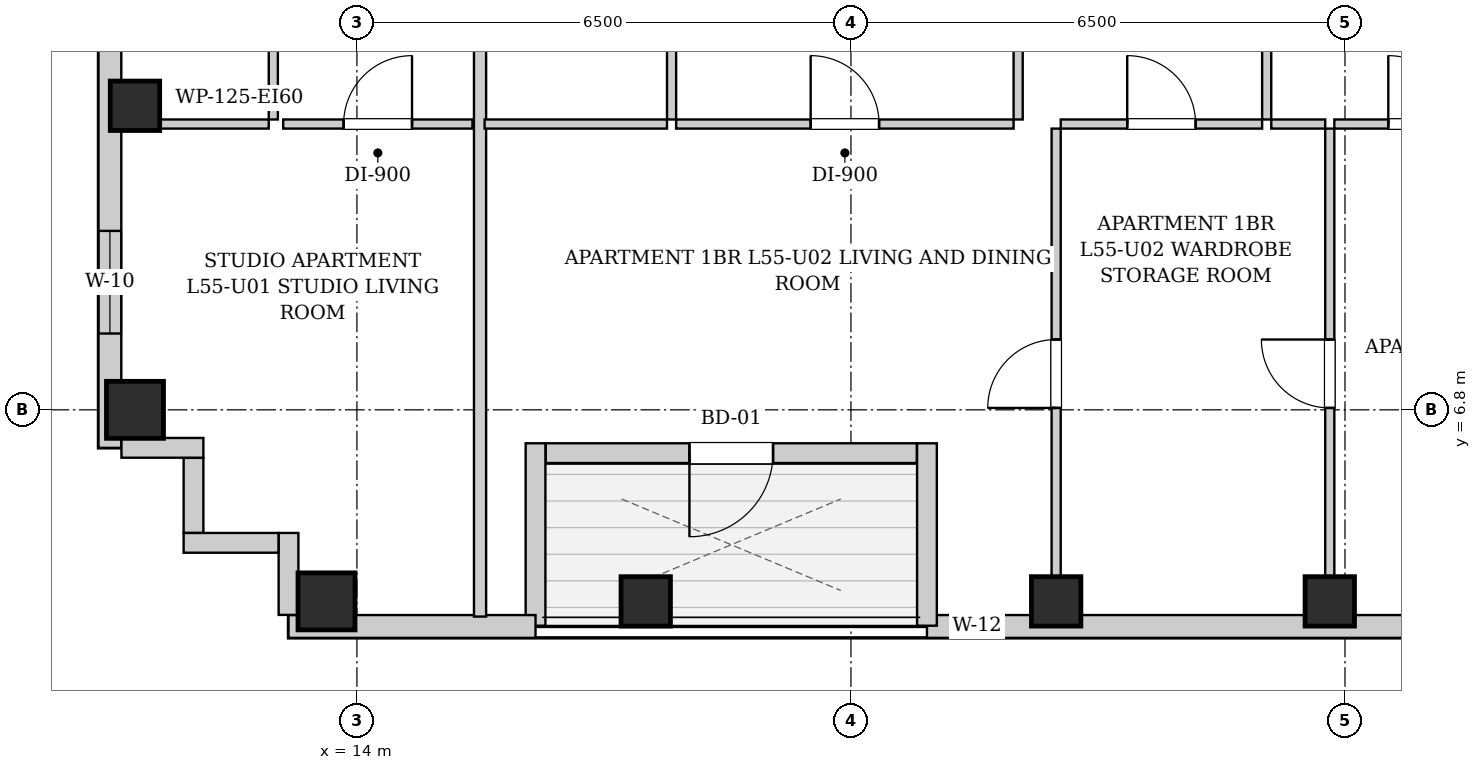
"""IFC4 building model, lengths in metres.
Left out: names, types, materials, properties, quantities, classifications, styles, units other than length and angle.
Written with IfcOpenShell. Run it as: python <this file> out.ifc"""

import sys

from ifc_helpers import new_model, si_unit, direction, frame, frame_2d, origin, origin_2d, place, context, subcontext, project, spatial, rectangle, extrude, element, fill, save


model = new_model("IFC4")
c1 = context("Model", 3, precision=1e-05, world=origin(), true_north=direction((0.0, 1.0)))
c2 = subcontext(c1, "Body", "Model", "MODEL_VIEW")
j1 = project(units=[si_unit("LENGTHUNIT", "METRE"), si_unit("PLANEANGLEUNIT", "RADIAN")], contexts=[c1])
p1 = place(None, origin())
s1 = spatial("IfcSite", under=j1, at=p1, CompositionType="ELEMENT")
p2 = place(p1, origin())
s2 = spatial("IfcBuilding", under=s1, at=p2, CompositionType="ELEMENT")
p3 = place(p2, frame((0.0, 0.0, 190.9)))
s3 = spatial("IfcBuildingStorey", under=s2, at=p3, CompositionType="ELEMENT", Elevation=190.9)
p4 = place(p3, frame((13.6, 4.28, 0.0), z_axis=(0.0, 0.0, 1.0), x_axis=(1.0, 0.0, 0.0)))
e1 = element("IfcColumn", 1, at=p4, inside=s3, PredefinedType="COLUMN", context=c2, shape_type="SweptSolid", body=[
    extrude(rectangle(XDim=0.75, YDim=0.75, at=origin_2d()), origin(), (0.0, 0.0, 1.0), 3.3),
])
for number, where, z_axis, x_axis in (
    (2, (17.8, 4.28, 0.0), (0.0, 0.0, 1.0), (1.0, 0.0, 0.0)),
    (3, (23.2, 4.28, 0.0), (0.0, 0.0, 1.0), (1.0, 0.0, 0.0)),
    (4, (26.8, 4.28, 0.0), (0.0, 0.0, 1.0), (1.0, 0.0, 0.0)),
):
    element("IfcColumn", number, at=place(p3, frame(where, z_axis=z_axis, x_axis=x_axis)), inside=s3, PredefinedType="COLUMN", context=c2, shape_type="SweptSolid", body=[
        extrude(rectangle(XDim=0.65, YDim=0.65, at=origin_2d()), origin(), (0.0, 0.0, 1.0), 3.3),
    ])
p5 = place(p3, frame((11.08, 6.8, 0.0), z_axis=(0.0, 0.0, 1.0), x_axis=(1.0, 0.0, 0.0)))
e5 = element("IfcColumn", 5, at=p5, inside=s3, PredefinedType="COLUMN", context=c2, shape_type="SweptSolid", body=[
    extrude(rectangle(XDim=0.75, YDim=0.75, at=origin_2d()), origin(), (0.0, 0.0, 1.0), 3.3),
])
p6 = place(p3, frame((11.08, 10.8, 0.0), z_axis=(0.0, 0.0, 1.0), x_axis=(1.0, 0.0, 0.0)))
e6 = element("IfcColumn", 6, at=p6, inside=s3, PredefinedType="COLUMN", context=c2, shape_type="SweptSolid", body=[
    extrude(rectangle(XDim=0.65, YDim=0.65, at=origin_2d()), origin(), (0.0, 0.0, 1.0), 3.3),
])
p7 = place(p3, frame((37.8, 3.95, 0.0), z_axis=(0.0, 0.0, 1.0), x_axis=(-1.0, 0.0, 0.0)))
e7 = element("IfcWall", 7, at=p7, inside=s3, PredefinedType="SOLIDWALL", context=c2, shape_type="SweptSolid", body=[
    extrude(rectangle(XDim=16.3, YDim=0.3, at=frame_2d((8.15, 0.0))), origin(), (0.0, 0.0, 1.0), 3.04),
])
p8 = place(p7, frame((15.3, 0.0, 0.55)))
e8 = element("IfcOpeningElement", 8, at=p8, cuts=e7, PredefinedType="OPENING", context=c2, shape_type="SweptSolid", body=[
    extrude(rectangle(XDim=0.68, YDim=1.2, at=frame_2d((0.34, 0.6))), frame((0.0, 0.16, 0.0), z_axis=(0.0, -1.0, 0.0), x_axis=(1.0, 0.0, 0.0)), (0.0, 0.0, 1.0), 0.32),
])
p9 = place(p7, frame((8.154, 0.0, 0.55)))
e9 = element("IfcOpeningElement", 9, at=p9, cuts=e7, PredefinedType="OPENING", context=c2, shape_type="SweptSolid", body=[
    extrude(rectangle(XDim=1.35, YDim=1.2, at=frame_2d((0.675, 0.6))), frame((0.0, 0.16, 0.0), z_axis=(0.0, -1.0, 0.0), x_axis=(1.0, 0.0, 0.0)), (0.0, 0.0, 1.0), 0.32),
])
p10 = place(p7, frame((2.721, 0.0, 0.55)))
e10 = element("IfcOpeningElement", 10, at=p10, cuts=e7, PredefinedType="OPENING", context=c2, shape_type="SweptSolid", body=[
    extrude(rectangle(XDim=1.35, YDim=1.2, at=frame_2d((0.675, 0.6))), frame((0.0, 0.16, 0.0), z_axis=(0.0, -1.0, 0.0), x_axis=(1.0, 0.0, 0.0)), (0.0, 0.0, 1.0), 0.32),
])
p11 = place(p7, frame((1.035, 0.0, 0.55)))
e11 = element("IfcOpeningElement", 11, at=p11, cuts=e7, PredefinedType="OPENING", context=c2, shape_type="SweptSolid", body=[
    extrude(rectangle(XDim=1.35, YDim=1.2, at=frame_2d((0.675, 0.6))), frame((0.0, 0.16, 0.0), z_axis=(0.0, -1.0, 0.0), x_axis=(1.0, 0.0, 0.0)), (0.0, 0.0, 1.0), 0.32),
])
p12 = place(p3, frame((21.5, 3.96, 0.0), z_axis=(0.0, 0.0, 1.0), x_axis=(0.0, 1.0, 0.0)))
e12 = element("IfcWall", 12, at=p12, inside=s3, PredefinedType="SOLIDWALL", context=c2, shape_type="SweptSolid", body=[
    extrude(rectangle(XDim=2.4, YDim=0.26, at=frame_2d((1.2, 0.0))), origin(), (0.0, 0.0, 1.0), 3.04),
])
p13 = place(p3, frame((21.366, 6.23, 0.0), z_axis=(0.0, 0.0, 1.0), x_axis=(-1.0, 0.0, 0.0)))
e13 = element("IfcWall", 13, at=p13, inside=s3, PredefinedType="SOLIDWALL", context=c2, shape_type="SweptSolid", body=[
    extrude(rectangle(XDim=4.882, YDim=0.26, at=frame_2d((2.441, 0.0))), origin(), (0.0, 0.0, 1.0), 3.04),
])
p14 = place(p13, frame((1.891, 0.0, 0.0)))
e14 = element("IfcOpeningElement", 14, at=p14, cuts=e13, PredefinedType="OPENING", context=c2, shape_type="SweptSolid", body=[
    extrude(rectangle(XDim=1.1, YDim=2.0, at=frame_2d((0.55, 1.0))), frame((0.0, 0.14, 0.0), z_axis=(0.0, -1.0, 0.0), x_axis=(1.0, 0.0, 0.0)), (0.0, 0.0, 1.0), 0.28),
])
p15 = place(p3, frame((16.35, 6.36, 0.0), z_axis=(0.0, 0.0, 1.0), x_axis=(0.0, -1.0, 0.0)))
e15 = element("IfcWall", 15, at=p15, inside=s3, PredefinedType="SOLIDWALL", context=c2, shape_type="SweptSolid", body=[
    extrude(rectangle(XDim=2.4, YDim=0.26, at=frame_2d((1.2, 0.0))), origin(), (0.0, 0.0, 1.0), 3.04),
])
p16 = place(p3, frame((16.35, 3.95, 0.0), z_axis=(0.0, 0.0, 1.0), x_axis=(-1.0, 0.0, 0.0)))
e16 = element("IfcWall", 16, at=p16, inside=s3, PredefinedType="SOLIDWALL", context=c2, shape_type="SweptSolid", body=[
    extrude(rectangle(XDim=3.25, YDim=0.3, at=frame_2d((1.625, 0.0))), origin(), (0.0, 0.0, 1.0), 3.04),
])
p17 = place(p3, frame((10.75, 6.3, 0.0), z_axis=(0.0, 0.0, 1.0), x_axis=(0.0, 1.0, 0.0)))
e17 = element("IfcWall", 17, at=p17, inside=s3, PredefinedType="SOLIDWALL", context=c2, shape_type="SweptSolid", body=[
    extrude(rectangle(XDim=31.4, YDim=0.3, at=frame_2d((15.7, 0.0))), origin(), (0.0, 0.0, 1.0), 3.04),
])
p18 = place(p17, frame((1.504, 0.0, 0.55)))
e18 = element("IfcOpeningElement", 18, at=p18, cuts=e17, PredefinedType="OPENING", context=c2, shape_type="SweptSolid", body=[
    extrude(rectangle(XDim=1.35, YDim=1.2, at=frame_2d((0.675, 0.6))), frame((0.0, 0.16, 0.0), z_axis=(0.0, -1.0, 0.0), x_axis=(1.0, 0.0, 0.0)), (0.0, 0.0, 1.0), 0.32),
])
p19 = place(p17, frame((28.546, 0.0, 0.55)))
e19 = element("IfcOpeningElement", 19, at=p19, cuts=e17, PredefinedType="OPENING", context=c2, shape_type="SweptSolid", body=[
    extrude(rectangle(XDim=1.35, YDim=1.2, at=frame_2d((0.675, 0.6))), frame((0.0, 0.16, 0.0), z_axis=(0.0, -1.0, 0.0), x_axis=(1.0, 0.0, 0.0)), (0.0, 0.0, 1.0), 0.32),
])
p20 = place(p17, frame((11.85, 0.0, 0.55)))
e20 = element("IfcOpeningElement", 20, at=p20, cuts=e17, PredefinedType="OPENING", context=c2, shape_type="SweptSolid", body=[
    extrude(rectangle(XDim=1.35, YDim=1.2, at=frame_2d((0.675, 0.6))), frame((0.0, 0.16, 0.0), z_axis=(0.0, -1.0, 0.0), x_axis=(1.0, 0.0, 0.0)), (0.0, 0.0, 1.0), 0.32),
])
p21 = place(p17, frame((9.185, 0.0, 0.55)))
e21 = element("IfcOpeningElement", 21, at=p21, cuts=e17, PredefinedType="OPENING", context=c2, shape_type="SweptSolid", body=[
    extrude(rectangle(XDim=1.35, YDim=1.2, at=frame_2d((0.675, 0.6))), frame((0.0, 0.16, 0.0), z_axis=(0.0, -1.0, 0.0), x_axis=(1.0, 0.0, 0.0)), (0.0, 0.0, 1.0), 0.32),
])
p22 = place(p17, frame((19.006, 0.0, 0.55)))
e22 = element("IfcOpeningElement", 22, at=p22, cuts=e17, PredefinedType="OPENING", context=c2, shape_type="SweptSolid", body=[
    extrude(rectangle(XDim=1.35, YDim=1.2, at=frame_2d((0.675, 0.6))), frame((0.0, 0.16, 0.0), z_axis=(0.0, -1.0, 0.0), x_axis=(1.0, 0.0, 0.0)), (0.0, 0.0, 1.0), 0.32),
])
p23 = place(p17, frame((20.616, 0.0, 0.55)))
e23 = element("IfcOpeningElement", 23, at=p23, cuts=e17, PredefinedType="OPENING", context=c2, shape_type="SweptSolid", body=[
    extrude(rectangle(XDim=1.35, YDim=1.2, at=frame_2d((0.675, 0.6))), frame((0.0, 0.16, 0.0), z_axis=(0.0, -1.0, 0.0), x_axis=(1.0, 0.0, 0.0)), (0.0, 0.0, 1.0), 0.32),
])
p24 = place(p3, frame((13.1, 4.102, 0.0), z_axis=(0.0, 0.0, 1.0), x_axis=(0.0, 1.0, 0.0)))
e24 = element("IfcWall", 24, at=p24, inside=s3, PredefinedType="SOLIDWALL", context=c2, shape_type="SweptSolid", body=[
    extrude(rectangle(XDim=1.078, YDim=0.26, at=frame_2d((0.539, 0.0))), origin(), (0.0, 0.0, 1.0), 3.04),
])
p25 = place(p3, frame((12.968, 5.05, 0.0), z_axis=(0.0, 0.0, 1.0), x_axis=(-1.0, 0.0, 0.0)))
e25 = element("IfcWall", 25, at=p25, inside=s3, PredefinedType="SOLIDWALL", context=c2, shape_type="SweptSolid", body=[
    extrude(rectangle(XDim=1.248, YDim=0.26, at=frame_2d((0.624, 0.0))), origin(), (0.0, 0.0, 1.0), 3.04),
])
p26 = place(p3, frame((11.85, 5.182, 0.0), z_axis=(0.0, 0.0, 1.0), x_axis=(0.0, 1.0, 0.0)))
e26 = element("IfcWall", 26, at=p26, inside=s3, PredefinedType="SOLIDWALL", context=c2, shape_type="SweptSolid", body=[
    extrude(rectangle(XDim=0.986, YDim=0.26, at=frame_2d((0.493, 0.0))), origin(), (0.0, 0.0, 1.0), 3.04),
])
p27 = place(p3, frame((11.98, 6.3, 0.0), z_axis=(0.0, 0.0, 1.0), x_axis=(-1.0, 0.0, 0.0)))
e27 = element("IfcWall", 27, at=p27, inside=s3, PredefinedType="SOLIDWALL", context=c2, shape_type="SweptSolid", body=[
    extrude(rectangle(XDim=1.078, YDim=0.26, at=frame_2d((0.539, 0.0))), origin(), (0.0, 0.0, 1.0), 3.04),
])
p28 = place(p3, frame((12.9, 10.62, 0.0), z_axis=(0.0, 0.0, 1.0), x_axis=(0.0, 1.0, 0.0)))
e28 = element("IfcWall", 28, at=p28, inside=s3, PredefinedType="PARTITIONING", context=c2, shape_type="SweptSolid", body=[
    extrude(rectangle(XDim=2.85, YDim=0.12, at=frame_2d((1.425, 0.0))), origin(), (0.0, 0.0, 1.0), 3.04),
])
p29 = place(p28, frame((0.995, 0.0, 0.0)))
e29 = element("IfcOpeningElement", 29, at=p29, cuts=e28, PredefinedType="OPENING", context=c2, shape_type="SweptSolid", body=[
    extrude(rectangle(XDim=0.86, YDim=2.05, at=frame_2d((0.43, 1.025))), frame((0.0, 0.07, 0.0), z_axis=(0.0, -1.0, 0.0), x_axis=(1.0, 0.0, 0.0)), (0.0, 0.0, 1.0), 0.14),
])
p30 = place(p3, frame((10.99, 10.56, 0.0), z_axis=(0.0, 0.0, 1.0), x_axis=(1.0, 0.0, 0.0)))
e30 = element("IfcWall", 30, at=p30, inside=s3, PredefinedType="PARTITIONING", context=c2, shape_type="SweptSolid", body=[
    extrude(rectangle(XDim=1.85, YDim=0.12, at=frame_2d((0.925, 0.0))), origin(), (0.0, 0.0, 1.0), 3.04),
])
p31 = place(p3, frame((13.03, 10.56, 0.0), z_axis=(0.0, 0.0, 1.0), x_axis=(1.0, 0.0, 0.0)))
e31 = element("IfcWall", 31, at=p31, inside=s3, PredefinedType="PARTITIONING", context=c2, shape_type="SweptSolid", body=[
    extrude(rectangle(XDim=2.49, YDim=0.12, at=frame_2d((1.245, 0.0))), origin(), (0.0, 0.0, 1.0), 3.04),
])
p32 = place(p31, frame((0.795, 0.0, 0.0)))
e32 = element("IfcOpeningElement", 32, at=p32, cuts=e31, PredefinedType="OPENING", context=c2, shape_type="SweptSolid", body=[
    extrude(rectangle(XDim=0.9, YDim=2.05, at=frame_2d((0.45, 1.025))), frame((0.0, 0.07, 0.0), z_axis=(0.0, -1.0, 0.0), x_axis=(1.0, 0.0, 0.0)), (0.0, 0.0, 1.0), 0.14),
])
p33 = place(p3, frame((15.62, 4.08, 0.0), z_axis=(0.0, 0.0, 1.0), x_axis=(0.0, 1.0, 0.0)))
e33 = element("IfcWall", 33, at=p33, inside=s3, PredefinedType="PARTITIONING", context=c2, shape_type="SweptSolid", body=[
    extrude(rectangle(XDim=9.39, YDim=0.16, at=frame_2d((4.695, 0.0))), origin(), (0.0, 0.0, 1.0), 3.04),
])
p34 = place(p3, frame((18.14, 10.62, 0.0), z_axis=(0.0, 0.0, 1.0), x_axis=(0.0, 1.0, 0.0)))
e34 = element("IfcWall", 34, at=p34, inside=s3, PredefinedType="PARTITIONING", context=c2, shape_type="SweptSolid", body=[
    extrude(rectangle(XDim=2.85, YDim=0.12, at=frame_2d((1.425, 0.0))), origin(), (0.0, 0.0, 1.0), 3.04),
])
p35 = place(p34, frame((0.995, 0.0, 0.0)))
e35 = element("IfcOpeningElement", 35, at=p35, cuts=e34, PredefinedType="OPENING", context=c2, shape_type="SweptSolid", body=[
    extrude(rectangle(XDim=0.86, YDim=2.05, at=frame_2d((0.43, 1.025))), frame((0.0, 0.07, 0.0), z_axis=(0.0, -1.0, 0.0), x_axis=(1.0, 0.0, 0.0)), (0.0, 0.0, 1.0), 0.14),
])
p36 = place(p3, frame((15.68, 10.56, 0.0), z_axis=(0.0, 0.0, 1.0), x_axis=(1.0, 0.0, 0.0)))
e36 = element("IfcWall", 36, at=p36, inside=s3, PredefinedType="PARTITIONING", context=c2, shape_type="SweptSolid", body=[
    extrude(rectangle(XDim=2.4, YDim=0.12, at=frame_2d((1.2, 0.0))), origin(), (0.0, 0.0, 1.0), 3.04),
])
p37 = place(p3, frame((22.7, 10.62, 0.0), z_axis=(0.0, 0.0, 1.0), x_axis=(0.0, 1.0, 0.0)))
e37 = element("IfcWall", 37, at=p37, inside=s3, PredefinedType="PARTITIONING", context=c2, shape_type="SweptSolid", body=[
    extrude(rectangle(XDim=2.85, YDim=0.12, at=frame_2d((1.425, 0.0))), origin(), (0.0, 0.0, 1.0), 3.04),
])
p38 = place(p37, frame((0.975, 0.0, 0.0)))
e38 = element("IfcOpeningElement", 38, at=p38, cuts=e37, PredefinedType="OPENING", context=c2, shape_type="SweptSolid", body=[
    extrude(rectangle(XDim=0.9, YDim=2.05, at=frame_2d((0.45, 1.025))), frame((0.0, 0.07, 0.0), z_axis=(0.0, -1.0, 0.0), x_axis=(1.0, 0.0, 0.0)), (0.0, 0.0, 1.0), 0.14),
])
p39 = place(p3, frame((18.2, 10.56, 0.0), z_axis=(0.0, 0.0, 1.0), x_axis=(1.0, 0.0, 0.0)))
e39 = element("IfcWall", 39, at=p39, inside=s3, PredefinedType="PARTITIONING", context=c2, shape_type="SweptSolid", body=[
    extrude(rectangle(XDim=4.44, YDim=0.12, at=frame_2d((2.22, 0.0))), origin(), (0.0, 0.0, 1.0), 3.04),
])
p40 = place(p39, frame((1.77, 0.0, 0.0)))
e40 = element("IfcOpeningElement", 40, at=p40, cuts=e39, PredefinedType="OPENING", context=c2, shape_type="SweptSolid", body=[
    extrude(rectangle(XDim=0.9, YDim=2.05, at=frame_2d((0.45, 1.025))), frame((0.0, 0.07, 0.0), z_axis=(0.0, -1.0, 0.0), x_axis=(1.0, 0.0, 0.0)), (0.0, 0.0, 1.0), 0.14),
])
p41 = place(p3, frame((25.97, 10.62, 0.0), z_axis=(0.0, 0.0, 1.0), x_axis=(0.0, 1.0, 0.0)))
e41 = element("IfcWall", 41, at=p41, inside=s3, PredefinedType="PARTITIONING", context=c2, shape_type="SweptSolid", body=[
    extrude(rectangle(XDim=2.85, YDim=0.12, at=frame_2d((1.425, 0.0))), origin(), (0.0, 0.0, 1.0), 3.04),
])
p42 = place(p41, frame((0.975, 0.0, 0.0)))
e42 = element("IfcOpeningElement", 42, at=p42, cuts=e41, PredefinedType="OPENING", context=c2, shape_type="SweptSolid", body=[
    extrude(rectangle(XDim=0.9, YDim=2.05, at=frame_2d((0.45, 1.025))), frame((0.0, 0.07, 0.0), z_axis=(0.0, -1.0, 0.0), x_axis=(1.0, 0.0, 0.0)), (0.0, 0.0, 1.0), 0.14),
])
p43 = place(p3, frame((23.26, 10.56, 0.0), z_axis=(0.0, 0.0, 1.0), x_axis=(1.0, 0.0, 0.0)))
e43 = element("IfcWall", 43, at=p43, inside=s3, PredefinedType="PARTITIONING", context=c2, shape_type="SweptSolid", body=[
    extrude(rectangle(XDim=2.65, YDim=0.12, at=frame_2d((1.325, 0.0))), origin(), (0.0, 0.0, 1.0), 3.04),
])
p44 = place(p43, frame((0.875, 0.0, 0.0)))
e44 = element("IfcOpeningElement", 44, at=p44, cuts=e43, PredefinedType="OPENING", context=c2, shape_type="SweptSolid", body=[
    extrude(rectangle(XDim=0.9, YDim=2.05, at=frame_2d((0.45, 1.025))), frame((0.0, 0.07, 0.0), z_axis=(0.0, -1.0, 0.0), x_axis=(1.0, 0.0, 0.0)), (0.0, 0.0, 1.0), 0.14),
])
p45 = place(p3, frame((26.03, 10.56, 0.0), z_axis=(0.0, 0.0, 1.0), x_axis=(1.0, 0.0, 0.0)))
e45 = element("IfcWall", 45, at=p45, inside=s3, PredefinedType="PARTITIONING", context=c2, shape_type="SweptSolid", body=[
    extrude(rectangle(XDim=0.71, YDim=0.12, at=frame_2d((0.355, 0.0))), origin(), (0.0, 0.0, 1.0), 3.04),
])
p46 = place(p3, frame((26.86, 10.56, 0.0), z_axis=(0.0, 0.0, 1.0), x_axis=(1.0, 0.0, 0.0)))
e46 = element("IfcWall", 46, at=p46, inside=s3, PredefinedType="PARTITIONING", context=c2, shape_type="SweptSolid", body=[
    extrude(rectangle(XDim=2.32, YDim=0.12, at=frame_2d((1.16, 0.0))), origin(), (0.0, 0.0, 1.0), 3.04),
])
p47 = place(p46, frame((0.71, 0.0, 0.0)))
e47 = element("IfcOpeningElement", 47, at=p47, cuts=e46, PredefinedType="OPENING", context=c2, shape_type="SweptSolid", body=[
    extrude(rectangle(XDim=0.9, YDim=2.05, at=frame_2d((0.45, 1.025))), frame((0.0, 0.07, 0.0), z_axis=(0.0, -1.0, 0.0), x_axis=(1.0, 0.0, 0.0)), (0.0, 0.0, 1.0), 0.14),
])
p48 = place(p3, frame((23.2, 4.08, 0.0), z_axis=(0.0, 0.0, 1.0), x_axis=(0.0, 1.0, 0.0)))
e48 = element("IfcWall", 48, at=p48, inside=s3, PredefinedType="PARTITIONING", context=c2, shape_type="SweptSolid", body=[
    extrude(rectangle(XDim=6.42, YDim=0.12, at=frame_2d((3.21, 0.0))), origin(), (0.0, 0.0, 1.0), 3.04),
])
p49 = place(p48, frame((2.745, 0.0, 0.0)))
e49 = element("IfcOpeningElement", 49, at=p49, cuts=e48, PredefinedType="OPENING", context=c2, shape_type="SweptSolid", body=[
    extrude(rectangle(XDim=0.9, YDim=2.05, at=frame_2d((0.45, 1.025))), frame((0.0, 0.07, 0.0), z_axis=(0.0, -1.0, 0.0), x_axis=(1.0, 0.0, 0.0)), (0.0, 0.0, 1.0), 0.14),
])
p50 = place(p3, frame((26.8, 4.08, 0.0), z_axis=(0.0, 0.0, 1.0), x_axis=(0.0, 1.0, 0.0)))
e50 = element("IfcWall", 50, at=p50, inside=s3, PredefinedType="PARTITIONING", context=c2, shape_type="SweptSolid", body=[
    extrude(rectangle(XDim=6.42, YDim=0.12, at=frame_2d((3.21, 0.0))), origin(), (0.0, 0.0, 1.0), 3.04),
])
p51 = place(p50, frame((2.745, 0.0, 0.0)))
e51 = element("IfcOpeningElement", 51, at=p51, cuts=e50, PredefinedType="OPENING", context=c2, shape_type="SweptSolid", body=[
    extrude(rectangle(XDim=0.9, YDim=2.05, at=frame_2d((0.45, 1.025))), frame((0.0, 0.07, 0.0), z_axis=(0.0, -1.0, 0.0), x_axis=(1.0, 0.0, 0.0)), (0.0, 0.0, 1.0), 0.14),
])
p52 = place(p32, origin())
e52 = element("IfcDoor", 52, at=p52, inside=s3, OperationType="SINGLE_SWING_RIGHT", PredefinedType="DOOR", context=c2, shape_type="SweptSolid", body=[
    extrude(rectangle(XDim=0.9, YDim=2.05, at=frame_2d((0.45, 1.025))), frame((0.0, 0.025, 0.0), z_axis=(0.0, -1.0, 0.0), x_axis=(1.0, 0.0, 0.0)), (0.0, 0.0, 1.0), 0.05),
])
fill(e32, e52)
p53 = place(p40, origin())
e53 = element("IfcDoor", 53, at=p53, inside=s3, OperationType="SINGLE_SWING_LEFT", PredefinedType="DOOR", context=c2, shape_type="SweptSolid", body=[
    extrude(rectangle(XDim=0.9, YDim=2.05, at=frame_2d((0.45, 1.025))), frame((0.0, 0.025, 0.0), z_axis=(0.0, -1.0, 0.0), x_axis=(1.0, 0.0, 0.0)), (0.0, 0.0, 1.0), 0.05),
])
fill(e40, e53)
p54 = place(p44, origin())
e54 = element("IfcDoor", 54, at=p54, inside=s3, OperationType="SINGLE_SWING_LEFT", PredefinedType="DOOR", context=c2, shape_type="SweptSolid", body=[
    extrude(rectangle(XDim=0.9, YDim=2.05, at=frame_2d((0.45, 1.025))), frame((0.0, 0.025, 0.0), z_axis=(0.0, -1.0, 0.0), x_axis=(1.0, 0.0, 0.0)), (0.0, 0.0, 1.0), 0.05),
])
fill(e44, e54)
p55 = place(p47, origin())
e55 = element("IfcDoor", 55, at=p55, inside=s3, OperationType="SINGLE_SWING_LEFT", PredefinedType="DOOR", context=c2, shape_type="SweptSolid", body=[
    extrude(rectangle(XDim=0.9, YDim=2.05, at=frame_2d((0.45, 1.025))), frame((0.0, 0.025, 0.0), z_axis=(0.0, -1.0, 0.0), x_axis=(1.0, 0.0, 0.0)), (0.0, 0.0, 1.0), 0.05),
])
fill(e47, e55)
p56 = place(p49, origin())
e56 = element("IfcDoor", 56, at=p56, inside=s3, OperationType="SINGLE_SWING_LEFT", PredefinedType="DOOR", context=c2, shape_type="SweptSolid", body=[
    extrude(rectangle(XDim=0.9, YDim=2.05, at=frame_2d((0.45, 1.025))), frame((0.0, 0.025, 0.0), z_axis=(0.0, -1.0, 0.0), x_axis=(1.0, 0.0, 0.0)), (0.0, 0.0, 1.0), 0.05),
])
fill(e49, e56)
p57 = place(p51, origin())
e57 = element("IfcDoor", 57, at=p57, inside=s3, OperationType="SINGLE_SWING_RIGHT", PredefinedType="DOOR", context=c2, shape_type="SweptSolid", body=[
    extrude(rectangle(XDim=0.9, YDim=2.05, at=frame_2d((0.45, 1.025))), frame((0.0, 0.025, 0.0), z_axis=(0.0, -1.0, 0.0), x_axis=(1.0, 0.0, 0.0)), (0.0, 0.0, 1.0), 0.05),
])
fill(e51, e57)
p58 = place(p14, origin())
e58 = element("IfcDoor", 58, at=p58, inside=s3, OperationType="SINGLE_SWING_RIGHT", PredefinedType="DOOR", context=c2, shape_type="SweptSolid", body=[
    extrude(rectangle(XDim=1.1, YDim=2.0, at=frame_2d((0.55, 1.0))), frame((0.0, 0.025, 0.0), z_axis=(0.0, -1.0, 0.0), x_axis=(1.0, 0.0, 0.0)), (0.0, 0.0, 1.0), 0.05),
])
fill(e14, e58)
p59 = place(p18, origin())
e59 = element("IfcWindow", 59, at=p59, inside=s3, PartitioningType="SINGLE_PANEL", PredefinedType="WINDOW", context=c2, shape_type="SweptSolid", body=[
    extrude(rectangle(XDim=1.35, YDim=1.2, at=frame_2d((0.675, 0.6))), frame((0.0, 0.03, 0.0), z_axis=(0.0, -1.0, 0.0), x_axis=(1.0, 0.0, 0.0)), (0.0, 0.0, 1.0), 0.06),
])
fill(e18, e59)
p60 = place(p8, origin())
e60 = element("IfcWindow", 60, at=p60, inside=s3, PartitioningType="SINGLE_PANEL", PredefinedType="WINDOW", context=c2, shape_type="SweptSolid", body=[
    extrude(rectangle(XDim=0.68, YDim=1.2, at=frame_2d((0.34, 0.6))), frame((0.0, 0.03, 0.0), z_axis=(0.0, -1.0, 0.0), x_axis=(1.0, 0.0, 0.0)), (0.0, 0.0, 1.0), 0.06),
])
fill(e8, e60)
save(model, sys.argv[1])
